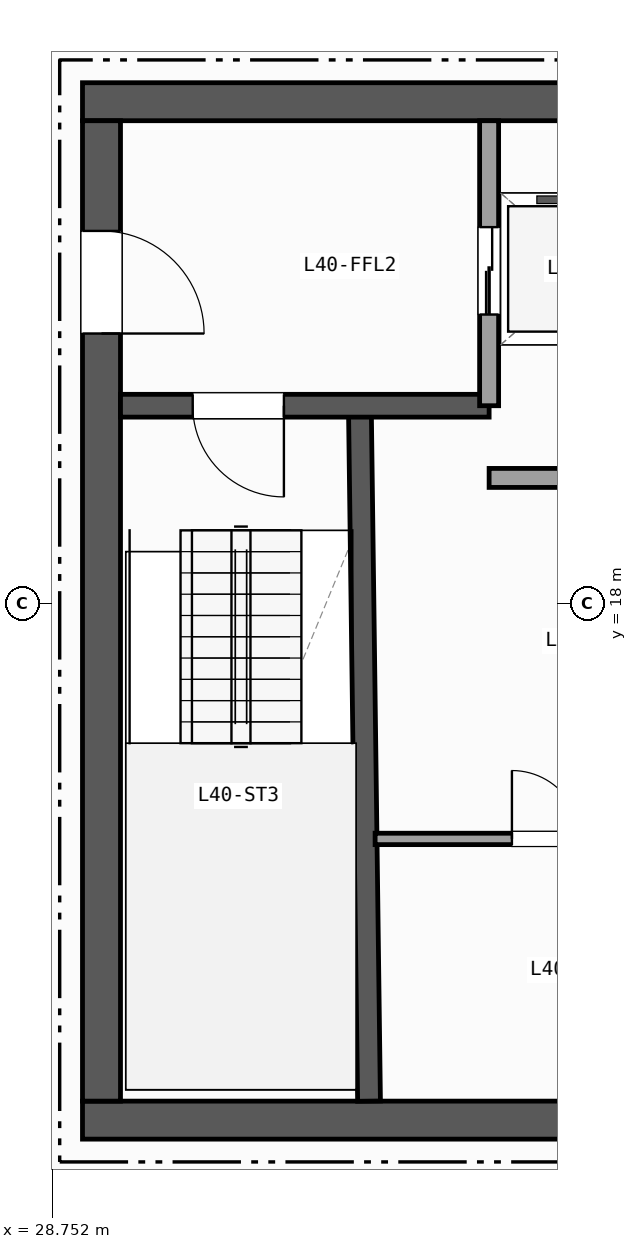
"""IFC4 building model, lengths in metres.
Left out: names, types, materials, properties, quantities, classifications, styles, units other than length and angle.
Written with IfcOpenShell. Run it as: python <this file> out.ifc"""

import sys

from ifc_helpers import new_model, si_unit, direction, frame, frame_2d, origin, place, context, subcontext, project, spatial, rectangle, extrude, element, fill, save


model = new_model("IFC4")
c1 = context("Model", 3, precision=1e-05, world=origin(), true_north=direction((0.0, 1.0)))
c2 = subcontext(c1, "Body", "Model", "MODEL_VIEW")
j1 = project(units=[si_unit("LENGTHUNIT", "METRE"), si_unit("PLANEANGLEUNIT", "RADIAN")], contexts=[c1])
p1 = place(None, origin())
s1 = spatial("IfcSite", under=j1, at=p1, CompositionType="ELEMENT")
p2 = place(p1, origin())
s2 = spatial("IfcBuilding", under=s1, at=p2, CompositionType="ELEMENT")
p3 = place(p2, frame((0.0, 0.0, 161.8)))
s3 = spatial("IfcBuildingStorey", under=s2, at=p3, CompositionType="ELEMENT", Elevation=161.8)
p4 = place(p3, frame((29.15, 11.2, 0.0), z_axis=(0.0, 0.0, 1.0), x_axis=(1.0, 0.0, 0.0)))
e1 = element("IfcWall", 1, at=p4, inside=s3, PredefinedType="SHEAR", context=c2, shape_type="SweptSolid", body=[
    extrude(rectangle(XDim=13.9, YDim=0.5, at=frame_2d((6.95, 0.0))), origin(), (0.0, 0.0, 1.0), 3.42),
])
p5 = place(p3, frame((43.05, 24.6, 0.0), z_axis=(0.0, 0.0, 1.0), x_axis=(-1.0, 0.0, 0.0)))
e2 = element("IfcWall", 2, at=p5, inside=s3, PredefinedType="SHEAR", context=c2, shape_type="SweptSolid", body=[
    extrude(rectangle(XDim=13.9, YDim=0.5, at=frame_2d((6.95, 0.0))), origin(), (0.0, 0.0, 1.0), 3.42),
])
p6 = place(p5, frame((0.75, 0.0, 0.0)))
e3 = element("IfcOpeningElement", 3, at=p6, cuts=e2, PredefinedType="OPENING", context=c2, shape_type="SweptSolid", body=[
    extrude(rectangle(XDim=1.1, YDim=2.15, at=frame_2d((0.55, 1.075))), frame((0.0, 0.26, 0.0), z_axis=(0.0, -1.0, 0.0), x_axis=(1.0, 0.0, 0.0)), (0.0, 0.0, 1.0), 0.52),
])
p7 = place(p5, frame((2.25, 0.0, 0.0)))
e4 = element("IfcOpeningElement", 4, at=p7, cuts=e2, PredefinedType="OPENING", context=c2, shape_type="SweptSolid", body=[
    extrude(rectangle(XDim=0.9, YDim=2.1, at=frame_2d((0.45, 1.05))), frame((0.0, 0.26, 0.0), z_axis=(0.0, -1.0, 0.0), x_axis=(1.0, 0.0, 0.0)), (0.0, 0.0, 1.0), 0.52),
])
p8 = place(p5, frame((3.55, 0.0, 0.0)))
e5 = element("IfcOpeningElement", 5, at=p8, cuts=e2, PredefinedType="OPENING", context=c2, shape_type="SweptSolid", body=[
    extrude(rectangle(XDim=0.9, YDim=2.1, at=frame_2d((0.45, 1.05))), frame((0.0, 0.26, 0.0), z_axis=(0.0, -1.0, 0.0), x_axis=(1.0, 0.0, 0.0)), (0.0, 0.0, 1.0), 0.52),
])
p9 = place(p5, frame((4.9, 0.0, 0.0)))
e6 = element("IfcOpeningElement", 6, at=p9, cuts=e2, PredefinedType="OPENING", context=c2, shape_type="SweptSolid", body=[
    extrude(rectangle(XDim=0.9, YDim=2.1, at=frame_2d((0.45, 1.05))), frame((0.0, 0.26, 0.0), z_axis=(0.0, -1.0, 0.0), x_axis=(1.0, 0.0, 0.0)), (0.0, 0.0, 1.0), 0.52),
])
p10 = place(p3, frame((29.4, 24.35, 0.0), z_axis=(0.0, 0.0, 1.0), x_axis=(0.0, -1.0, 0.0)))
e7 = element("IfcWall", 7, at=p10, inside=s3, PredefinedType="SHEAR", context=c2, shape_type="SweptSolid", body=[
    extrude(rectangle(XDim=12.9, YDim=0.5, at=frame_2d((6.45, 0.0))), origin(), (0.0, 0.0, 1.0), 3.42),
])
p11 = place(p10, frame((1.45, 0.0, 0.0)))
e8 = element("IfcOpeningElement", 8, at=p11, cuts=e7, PredefinedType="OPENING", context=c2, shape_type="SweptSolid", body=[
    extrude(rectangle(XDim=1.35, YDim=2.15, at=frame_2d((0.675, 1.075))), frame((0.0, 0.26, 0.0), z_axis=(0.0, -1.0, 0.0), x_axis=(1.0, 0.0, 0.0)), (0.0, 0.0, 1.0), 0.52),
])
p12 = place(p3, frame((32.92, 11.45, 0.0), z_axis=(0.0, 0.0, 1.0), x_axis=(-0.013171578211, 0.999913251001, 0.0)))
e9 = element("IfcWall", 9, at=p12, inside=s3, PredefinedType="SHEAR", context=c2, shape_type="SweptSolid", body=[
    extrude(rectangle(XDim=9.101, YDim=0.3, at=frame_2d((4.55, 0.0))), origin(), (0.0, 0.0, 1.0), 3.42),
])
p13 = place(p3, frame((34.5, 20.6, 0.0), z_axis=(0.0, 0.0, 1.0), x_axis=(-1.0, 0.0, 0.0)))
e10 = element("IfcWall", 10, at=p13, inside=s3, PredefinedType="SHEAR", context=c2, shape_type="SweptSolid", body=[
    extrude(rectangle(XDim=4.85, YDim=0.3, at=frame_2d((2.425, 0.0))), origin(), (0.0, 0.0, 1.0), 3.42),
])
p14 = place(p13, frame((2.7, 0.0, 0.0)))
e11 = element("IfcOpeningElement", 11, at=p14, cuts=e10, PredefinedType="OPENING", context=c2, shape_type="SweptSolid", body=[
    extrude(rectangle(XDim=1.2, YDim=2.15, at=frame_2d((0.6, 1.075))), frame((0.0, 0.16, 0.0), z_axis=(0.0, -1.0, 0.0), x_axis=(1.0, 0.0, 0.0)), (0.0, 0.0, 1.0), 0.32),
])
p15 = place(p3, frame((34.5, 20.6, 0.0), z_axis=(0.0, 0.0, 1.0), x_axis=(0.0, 1.0, 0.0)))
e12 = element("IfcWall", 12, at=p15, inside=s3, PredefinedType="PARTITIONING", context=c2, shape_type="SweptSolid", body=[
    extrude(rectangle(XDim=3.75, YDim=0.25, at=frame_2d((1.875, 0.0))), origin(), (0.0, 0.0, 1.0), 3.42),
])
p16 = place(p15, frame((1.2, 0.0, 0.0)))
e13 = element("IfcOpeningElement", 13, at=p16, cuts=e12, PredefinedType="OPENING", context=c2, shape_type="SweptSolid", body=[
    extrude(rectangle(XDim=1.15, YDim=2.15, at=frame_2d((0.575, 1.075))), frame((0.0, 0.135, 0.0), z_axis=(0.0, -1.0, 0.0), x_axis=(1.0, 0.0, 0.0)), (0.0, 0.0, 1.0), 0.27),
])
p17 = place(p3, frame((34.5, 19.65, 0.0), z_axis=(0.0, 0.0, 1.0), x_axis=(1.0, 0.0, 0.0)))
e14 = element("IfcWall", 14, at=p17, inside=s3, PredefinedType="PARTITIONING", context=c2, shape_type="SweptSolid", body=[
    extrude(rectangle(XDim=6.48, YDim=0.25, at=frame_2d((3.24, 0.0))), origin(), (0.0, 0.0, 1.0), 3.42),
])
p18 = place(p3, frame((33.0, 14.9, 0.0), z_axis=(0.0, 0.0, 1.0), x_axis=(1.0, 0.0, 0.0)))
e15 = element("IfcWall", 15, at=p18, inside=s3, PredefinedType="PARTITIONING", context=c2, shape_type="SweptSolid", body=[
    extrude(rectangle(XDim=5.1, YDim=0.15, at=frame_2d((2.55, 0.0))), origin(), (0.0, 0.0, 1.0), 3.42),
])
p19 = place(p18, frame((1.8, 0.0, 0.0)))
e16 = element("IfcOpeningElement", 16, at=p19, cuts=e15, PredefinedType="OPENING", context=c2, shape_type="SweptSolid", body=[
    extrude(rectangle(XDim=0.9, YDim=2.1, at=frame_2d((0.45, 1.05))), frame((0.0, 0.085, 0.0), z_axis=(0.0, -1.0, 0.0), x_axis=(1.0, 0.0, 0.0)), (0.0, 0.0, 1.0), 0.17),
])
p20 = place(p14, origin())
e17 = element("IfcDoor", 17, at=p20, inside=s3, OperationType="SINGLE_SWING_LEFT", PredefinedType="DOOR", context=c2, shape_type="SweptSolid", body=[
    extrude(rectangle(XDim=1.2, YDim=2.15, at=frame_2d((0.6, 1.075))), frame((0.0, 0.025, 0.0), z_axis=(0.0, -1.0, 0.0), x_axis=(1.0, 0.0, 0.0)), (0.0, 0.0, 1.0), 0.05),
])
fill(e11, e17)
p21 = place(p11, origin())
e18 = element("IfcDoor", 18, at=p21, inside=s3, OperationType="SINGLE_SWING_RIGHT", PredefinedType="DOOR", context=c2, shape_type="SweptSolid", body=[
    extrude(rectangle(XDim=1.35, YDim=2.15, at=frame_2d((0.675, 1.075))), frame((0.0, 0.025, 0.0), z_axis=(0.0, -1.0, 0.0), x_axis=(1.0, 0.0, 0.0)), (0.0, 0.0, 1.0), 0.05),
])
fill(e8, e18)
p22 = place(p16, origin())
e19 = element("IfcDoor", 19, at=p22, inside=s3, OperationType="DOUBLE_DOOR_SLIDING", PredefinedType="DOOR", context=c2, shape_type="SweptSolid", body=[
    extrude(rectangle(XDim=1.15, YDim=2.15, at=frame_2d((0.575, 1.075))), frame((0.0, 0.025, 0.0), z_axis=(0.0, -1.0, 0.0), x_axis=(1.0, 0.0, 0.0)), (0.0, 0.0, 1.0), 0.05),
])
fill(e13, e19)
p23 = place(p19, origin())
e20 = element("IfcDoor", 20, at=p23, inside=s3, OperationType="SINGLE_SWING_LEFT", PredefinedType="DOOR", context=c2, shape_type="SweptSolid", body=[
    extrude(rectangle(XDim=0.9, YDim=2.1, at=frame_2d((0.45, 1.05))), frame((0.0, 0.025, 0.0), z_axis=(0.0, -1.0, 0.0), x_axis=(1.0, 0.0, 0.0)), (0.0, 0.0, 1.0), 0.05),
])
fill(e16, e20)
save(model, sys.argv[1])
